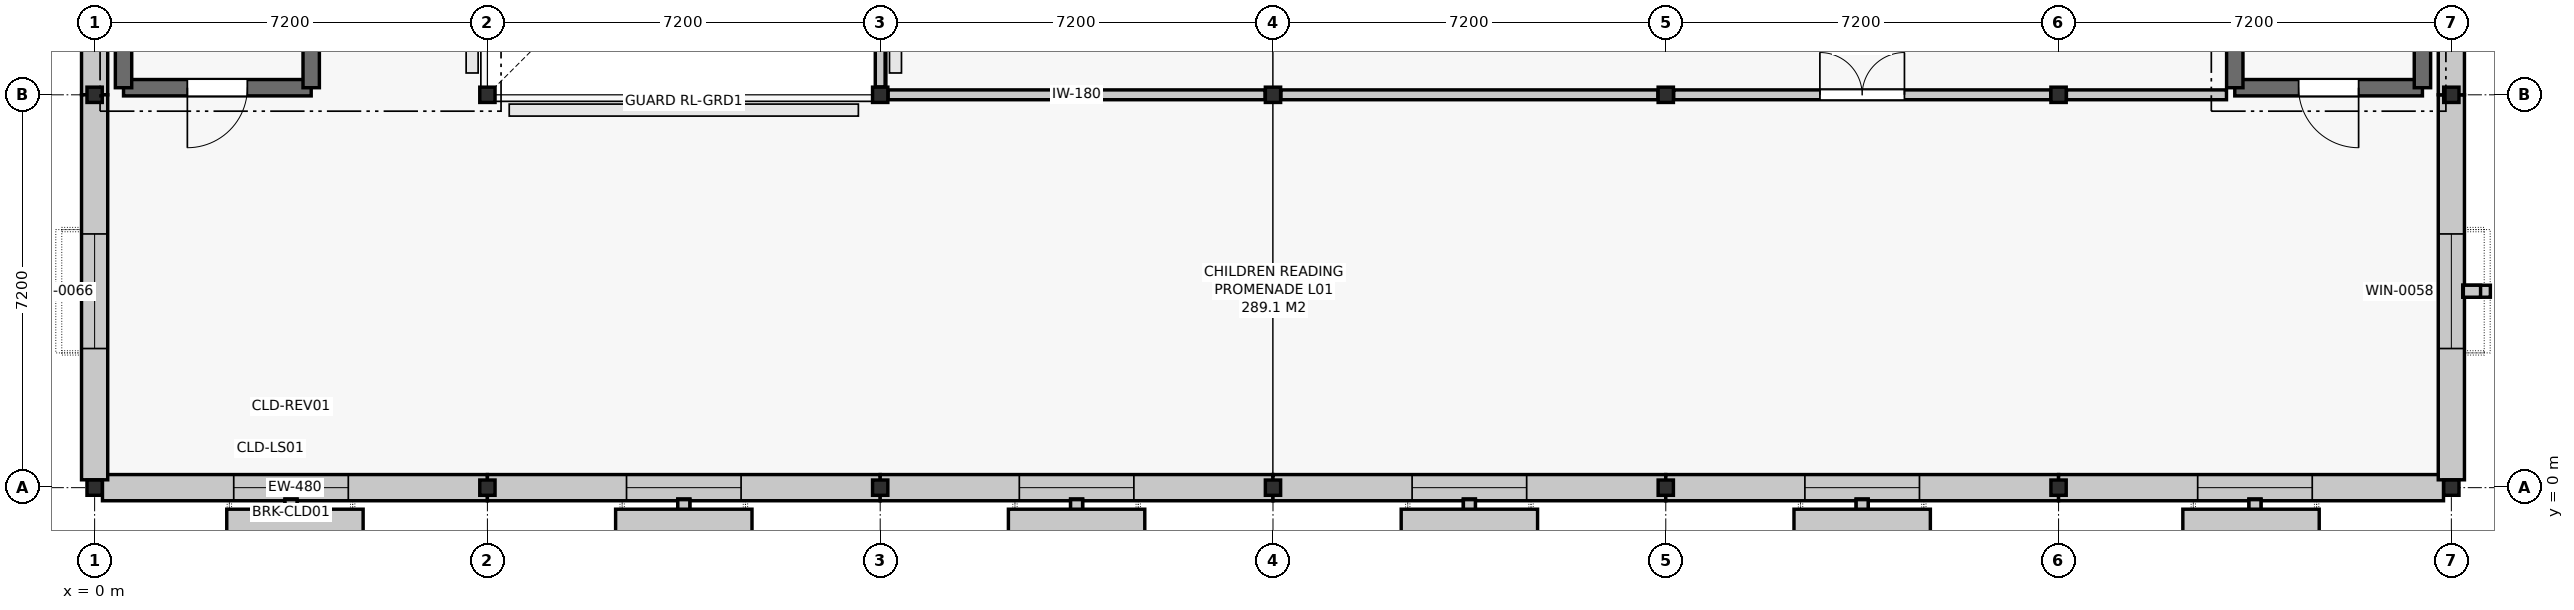
"""IFC4 building model, lengths in metres.
Left out: names, types, materials, properties, quantities, classifications, styles, units other than length and angle.
Written with IfcOpenShell. Run it as: python <this file> out.ifc"""

import sys

from ifc_helpers import new_model, si_unit, direction, frame, frame_2d, origin, origin_2d, place, context, subcontext, project, spatial, rectangle, i_section, extrude, element, fill, save


model = new_model("IFC4")
c1 = context("Model", 3, precision=1e-05, world=origin(), true_north=direction((0.0, 1.0)))
c2 = subcontext(c1, "Body", "Model", "MODEL_VIEW")
j1 = project(units=[si_unit("LENGTHUNIT", "METRE"), si_unit("PLANEANGLEUNIT", "RADIAN")], contexts=[c1])
p1 = place(None, origin())
s1 = spatial("IfcSite", under=j1, at=p1, CompositionType="ELEMENT")
p2 = place(p1, origin())
s2 = spatial("IfcBuilding", under=s1, at=p2, CompositionType="ELEMENT")
p3 = place(p2, frame((0.0, 0.0, 5.4)))
s3 = spatial("IfcBuildingStorey", under=s2, at=p3, CompositionType="ELEMENT", Elevation=5.4)
for number, where, z_axis, x_axis in (
    (1, (0.0, 0.0, 0.0), (0.0, 0.0, 1.0), (1.0, 0.0, 0.0)),
    (2, (0.0, 7.2, 0.0), (0.0, 0.0, 1.0), (1.0, 0.0, 0.0)),
    (3, (7.2, 0.0, 0.0), (0.0, 0.0, 1.0), (1.0, 0.0, 0.0)),
    (4, (7.2, 7.2, 0.0), (0.0, 0.0, 1.0), (1.0, 0.0, 0.0)),
    (5, (14.4, 0.0, 0.0), (0.0, 0.0, 1.0), (1.0, 0.0, 0.0)),
    (6, (14.4, 7.2, 0.0), (0.0, 0.0, 1.0), (1.0, 0.0, 0.0)),
    (7, (21.6, 0.0, 0.0), (0.0, 0.0, 1.0), (1.0, 0.0, 0.0)),
    (8, (21.6, 7.2, 0.0), (0.0, 0.0, 1.0), (1.0, 0.0, 0.0)),
    (9, (28.8, 0.0, 0.0), (0.0, 0.0, 1.0), (1.0, 0.0, 0.0)),
    (10, (28.8, 7.2, 0.0), (0.0, 0.0, 1.0), (1.0, 0.0, 0.0)),
    (11, (36.0, 0.0, 0.0), (0.0, 0.0, 1.0), (1.0, 0.0, 0.0)),
    (12, (36.0, 7.2, 0.0), (0.0, 0.0, 1.0), (1.0, 0.0, 0.0)),
    (13, (43.2, 0.0, 0.0), (0.0, 0.0, 1.0), (1.0, 0.0, 0.0)),
    (14, (43.2, 7.2, 0.0), (0.0, 0.0, 1.0), (1.0, 0.0, 0.0)),
):
    element("IfcColumn", number, at=place(p3, frame(where, z_axis=z_axis, x_axis=x_axis)), inside=s3, PredefinedType="COLUMN", context=c2, shape_type="SweptSolid", body=[
        extrude(i_section(OverallWidth=0.28, OverallDepth=0.28, WebThickness=0.01, FlangeThickness=0.018, FilletRadius=0.024, at=origin_2d()), origin(), (0.0, 0.0, 1.0), 4.8),
    ])
p4 = place(p3, frame((0.144, 0.0, 0.0), z_axis=(0.0, 0.0, 1.0), x_axis=(1.0, 0.0, 0.0)))
e15 = element("IfcWall", 15, at=p4, inside=s3, PredefinedType="SOLIDWALL", context=c2, shape_type="SweptSolid", body=[
    extrude(rectangle(XDim=7.056, YDim=0.48, at=frame_2d((3.528, 0.0))), origin(), (0.0, 0.0, 1.0), 3.8),
])
p5 = place(p4, frame((2.406, 0.0, 0.9)))
e16 = element("IfcOpeningElement", 16, at=p5, cuts=e15, PredefinedType="OPENING", context=c2, shape_type="SweptSolid", body=[
    extrude(rectangle(XDim=2.1, YDim=2.1, at=frame_2d((1.05, 1.05))), frame((0.0, 0.252, 0.0), z_axis=(0.0, -1.0, 0.0), x_axis=(1.0, 0.0, 0.0)), (0.0, 0.0, 1.0), 0.504),
])
p6 = place(p3, frame((7.2, 0.0, 0.0), z_axis=(0.0, 0.0, 1.0), x_axis=(1.0, 0.0, 0.0)))
e17 = element("IfcWall", 17, at=p6, inside=s3, PredefinedType="SOLIDWALL", context=c2, shape_type="SweptSolid", body=[
    extrude(rectangle(XDim=7.2, YDim=0.48, at=frame_2d((3.6, 0.0))), origin(), (0.0, 0.0, 1.0), 3.8),
])
p7 = place(p6, frame((2.55, 0.0, 0.9)))
e18 = element("IfcOpeningElement", 18, at=p7, cuts=e17, PredefinedType="OPENING", context=c2, shape_type="SweptSolid", body=[
    extrude(rectangle(XDim=2.1, YDim=2.1, at=frame_2d((1.05, 1.05))), frame((0.0, 0.252, 0.0), z_axis=(0.0, -1.0, 0.0), x_axis=(1.0, 0.0, 0.0)), (0.0, 0.0, 1.0), 0.504),
])
p8 = place(p3, frame((14.4, 0.0, 0.0), z_axis=(0.0, 0.0, 1.0), x_axis=(1.0, 0.0, 0.0)))
e19 = element("IfcWall", 19, at=p8, inside=s3, PredefinedType="SOLIDWALL", context=c2, shape_type="SweptSolid", body=[
    extrude(rectangle(XDim=7.2, YDim=0.48, at=frame_2d((3.6, 0.0))), origin(), (0.0, 0.0, 1.0), 3.8),
])
p9 = place(p8, frame((2.55, 0.0, 0.9)))
e20 = element("IfcOpeningElement", 20, at=p9, cuts=e19, PredefinedType="OPENING", context=c2, shape_type="SweptSolid", body=[
    extrude(rectangle(XDim=2.1, YDim=2.1, at=frame_2d((1.05, 1.05))), frame((0.0, 0.252, 0.0), z_axis=(0.0, -1.0, 0.0), x_axis=(1.0, 0.0, 0.0)), (0.0, 0.0, 1.0), 0.504),
])
p10 = place(p3, frame((21.6, 0.0, 0.0), z_axis=(0.0, 0.0, 1.0), x_axis=(1.0, 0.0, 0.0)))
e21 = element("IfcWall", 21, at=p10, inside=s3, PredefinedType="SOLIDWALL", context=c2, shape_type="SweptSolid", body=[
    extrude(rectangle(XDim=7.2, YDim=0.48, at=frame_2d((3.6, 0.0))), origin(), (0.0, 0.0, 1.0), 3.8),
])
p11 = place(p10, frame((2.55, 0.0, 0.9)))
e22 = element("IfcOpeningElement", 22, at=p11, cuts=e21, PredefinedType="OPENING", context=c2, shape_type="SweptSolid", body=[
    extrude(rectangle(XDim=2.1, YDim=2.1, at=frame_2d((1.05, 1.05))), frame((0.0, 0.252, 0.0), z_axis=(0.0, -1.0, 0.0), x_axis=(1.0, 0.0, 0.0)), (0.0, 0.0, 1.0), 0.504),
])
p12 = place(p3, frame((28.8, 0.0, 0.0), z_axis=(0.0, 0.0, 1.0), x_axis=(1.0, 0.0, 0.0)))
e23 = element("IfcWall", 23, at=p12, inside=s3, PredefinedType="SOLIDWALL", context=c2, shape_type="SweptSolid", body=[
    extrude(rectangle(XDim=7.2, YDim=0.48, at=frame_2d((3.6, 0.0))), origin(), (0.0, 0.0, 1.0), 3.8),
])
p13 = place(p12, frame((2.55, 0.0, 0.9)))
e24 = element("IfcOpeningElement", 24, at=p13, cuts=e23, PredefinedType="OPENING", context=c2, shape_type="SweptSolid", body=[
    extrude(rectangle(XDim=2.1, YDim=2.1, at=frame_2d((1.05, 1.05))), frame((0.0, 0.252, 0.0), z_axis=(0.0, -1.0, 0.0), x_axis=(1.0, 0.0, 0.0)), (0.0, 0.0, 1.0), 0.504),
])
p14 = place(p3, frame((36.0, 0.0, 0.0), z_axis=(0.0, 0.0, 1.0), x_axis=(1.0, 0.0, 0.0)))
e25 = element("IfcWall", 25, at=p14, inside=s3, PredefinedType="SOLIDWALL", context=c2, shape_type="SweptSolid", body=[
    extrude(rectangle(XDim=7.056, YDim=0.48, at=frame_2d((3.528, 0.0))), origin(), (0.0, 0.0, 1.0), 3.8),
])
p15 = place(p14, frame((2.55, 0.0, 0.9)))
e26 = element("IfcOpeningElement", 26, at=p15, cuts=e25, PredefinedType="OPENING", context=c2, shape_type="SweptSolid", body=[
    extrude(rectangle(XDim=2.1, YDim=2.1, at=frame_2d((1.05, 1.05))), frame((0.0, 0.252, 0.0), z_axis=(0.0, -1.0, 0.0), x_axis=(1.0, 0.0, 0.0)), (0.0, 0.0, 1.0), 0.504),
])
p16 = place(p3, frame((43.2, 0.144, 0.0), z_axis=(0.0, 0.0, 1.0), x_axis=(0.0, 1.0, 0.0)))
e27 = element("IfcWall", 27, at=p16, inside=s3, PredefinedType="SOLIDWALL", context=c2, shape_type="SweptSolid", body=[
    extrude(rectangle(XDim=7.056, YDim=0.48, at=frame_2d((3.528, 0.0))), origin(), (0.0, 0.0, 1.0), 3.8),
])
p17 = place(p16, frame((2.406, 0.0, 0.9)))
e28 = element("IfcOpeningElement", 28, at=p17, cuts=e27, PredefinedType="OPENING", context=c2, shape_type="SweptSolid", body=[
    extrude(rectangle(XDim=2.1, YDim=2.1, at=frame_2d((1.05, 1.05))), frame((0.0, 0.252, 0.0), z_axis=(0.0, -1.0, 0.0), x_axis=(1.0, 0.0, 0.0)), (0.0, 0.0, 1.0), 0.504),
])
p18 = place(p3, frame((43.2, 7.2, 0.0), z_axis=(0.0, 0.0, 1.0), x_axis=(0.0, 1.0, 0.0)))
e29 = element("IfcWall", 29, at=p18, inside=s3, PredefinedType="SOLIDWALL", context=c2, shape_type="SweptSolid", body=[
    extrude(rectangle(XDim=7.2, YDim=0.48, at=frame_2d((3.6, 0.0))), origin(), (0.0, 0.0, 1.0), 3.8),
])
p19 = place(p18, frame((2.55, 0.0, 0.9)))
e30 = element("IfcOpeningElement", 30, at=p19, cuts=e29, PredefinedType="OPENING", context=c2, shape_type="SweptSolid", body=[
    extrude(rectangle(XDim=2.1, YDim=2.1, at=frame_2d((1.05, 1.05))), frame((0.0, 0.252, 0.0), z_axis=(0.0, -1.0, 0.0), x_axis=(1.0, 0.0, 0.0)), (0.0, 0.0, 1.0), 0.504),
])
p20 = place(p3, frame((0.0, 14.4, 0.0), z_axis=(0.0, 0.0, 1.0), x_axis=(0.0, -1.0, 0.0)))
e31 = element("IfcWall", 31, at=p20, inside=s3, PredefinedType="SOLIDWALL", context=c2, shape_type="SweptSolid", body=[
    extrude(rectangle(XDim=7.2, YDim=0.48, at=frame_2d((3.6, 0.0))), origin(), (0.0, 0.0, 1.0), 3.8),
])
p21 = place(p20, frame((2.55, 0.0, 0.9)))
e32 = element("IfcOpeningElement", 32, at=p21, cuts=e31, PredefinedType="OPENING", context=c2, shape_type="SweptSolid", body=[
    extrude(rectangle(XDim=2.1, YDim=2.1, at=frame_2d((1.05, 1.05))), frame((0.0, 0.252, 0.0), z_axis=(0.0, -1.0, 0.0), x_axis=(1.0, 0.0, 0.0)), (0.0, 0.0, 1.0), 0.504),
])
p22 = place(p3, frame((0.0, 7.2, 0.0), z_axis=(0.0, 0.0, 1.0), x_axis=(0.0, -1.0, 0.0)))
e33 = element("IfcWall", 33, at=p22, inside=s3, PredefinedType="SOLIDWALL", context=c2, shape_type="SweptSolid", body=[
    extrude(rectangle(XDim=7.056, YDim=0.48, at=frame_2d((3.528, 0.0))), origin(), (0.0, 0.0, 1.0), 3.8),
])
p23 = place(p22, frame((2.55, 0.0, 0.9)))
e34 = element("IfcOpeningElement", 34, at=p23, cuts=e33, PredefinedType="OPENING", context=c2, shape_type="SweptSolid", body=[
    extrude(rectangle(XDim=2.1, YDim=2.1, at=frame_2d((1.05, 1.05))), frame((0.0, 0.252, 0.0), z_axis=(0.0, -1.0, 0.0), x_axis=(1.0, 0.0, 0.0)), (0.0, 0.0, 1.0), 0.504),
])
p24 = place(p3, frame((0.53, 7.33, 0.0), z_axis=(0.0, 0.0, 1.0), x_axis=(1.0, 0.0, 0.0)))
e35 = element("IfcWall", 35, at=p24, inside=s3, PredefinedType="SHEAR", context=c2, shape_type="SweptSolid", body=[
    extrude(rectangle(XDim=3.44, YDim=0.3, at=frame_2d((1.72, 0.0))), origin(), (0.0, 0.0, 1.0), 4.52),
])
p25 = place(p24, frame((1.17, 0.0, 0.0)))
e36 = element("IfcOpeningElement", 36, at=p25, cuts=e35, PredefinedType="OPENING", context=c2, shape_type="SweptSolid", body=[
    extrude(rectangle(XDim=1.1, YDim=2.15, at=frame_2d((0.55, 1.075))), frame((0.0, 0.162, 0.0), z_axis=(0.0, -1.0, 0.0), x_axis=(1.0, 0.0, 0.0)), (0.0, 0.0, 1.0), 0.324),
])
for number, where, z_axis, x_axis in (
    (37, (3.97, 7.33, 0.0), (0.0, 0.0, 1.0), (0.0, 1.0, 0.0)),
    (38, (0.53, 14.27, 0.0), (0.0, 0.0, 1.0), (0.0, -1.0, 0.0)),
):
    element("IfcWall", number, at=place(p3, frame(where, z_axis=z_axis, x_axis=x_axis)), inside=s3, PredefinedType="SHEAR", context=c2, shape_type="SweptSolid", body=[
        extrude(rectangle(XDim=6.94, YDim=0.3, at=frame_2d((3.47, 0.0))), origin(), (0.0, 0.0, 1.0), 4.52),
    ])
p26 = place(p3, frame((39.23, 7.33, 0.0), z_axis=(0.0, 0.0, 1.0), x_axis=(1.0, 0.0, 0.0)))
e39 = element("IfcWall", 39, at=p26, inside=s3, PredefinedType="SHEAR", context=c2, shape_type="SweptSolid", body=[
    extrude(rectangle(XDim=3.44, YDim=0.3, at=frame_2d((1.72, 0.0))), origin(), (0.0, 0.0, 1.0), 4.52),
])
p27 = place(p26, frame((1.17, 0.0, 0.0)))
e40 = element("IfcOpeningElement", 40, at=p27, cuts=e39, PredefinedType="OPENING", context=c2, shape_type="SweptSolid", body=[
    extrude(rectangle(XDim=1.1, YDim=2.15, at=frame_2d((0.55, 1.075))), frame((0.0, 0.162, 0.0), z_axis=(0.0, -1.0, 0.0), x_axis=(1.0, 0.0, 0.0)), (0.0, 0.0, 1.0), 0.324),
])
for number, where, z_axis, x_axis in (
    (41, (42.67, 7.33, 0.0), (0.0, 0.0, 1.0), (0.0, 1.0, 0.0)),
    (42, (39.23, 14.27, 0.0), (0.0, 0.0, 1.0), (0.0, -1.0, 0.0)),
):
    element("IfcWall", number, at=place(p3, frame(where, z_axis=z_axis, x_axis=x_axis)), inside=s3, PredefinedType="SHEAR", context=c2, shape_type="SweptSolid", body=[
        extrude(rectangle(XDim=6.94, YDim=0.3, at=frame_2d((3.47, 0.0))), origin(), (0.0, 0.0, 1.0), 4.52),
    ])
for number, where, z_axis, x_axis in (
    (43, (14.544, 7.2, 0.0), (0.0, 0.0, 1.0), (1.0, 0.0, 0.0)),
    (44, (21.744, 7.2, 0.0), (0.0, 0.0, 1.0), (1.0, 0.0, 0.0)),
):
    element("IfcWall", number, at=place(p3, frame(where, z_axis=z_axis, x_axis=x_axis)), inside=s3, PredefinedType="PARTITIONING", context=c2, shape_type="SweptSolid", body=[
        extrude(rectangle(XDim=6.912, YDim=0.18, at=frame_2d((3.456, 0.0))), origin(), (0.0, 0.0, 1.0), 4.005),
    ])
p28 = place(p3, frame((28.944, 7.2, 0.0), z_axis=(0.0, 0.0, 1.0), x_axis=(1.0, 0.0, 0.0)))
e45 = element("IfcWall", 45, at=p28, inside=s3, PredefinedType="PARTITIONING", context=c2, shape_type="SweptSolid", body=[
    extrude(rectangle(XDim=6.912, YDim=0.18, at=frame_2d((3.456, 0.0))), origin(), (0.0, 0.0, 1.0), 4.005),
])
p29 = place(p28, frame((2.681, 0.0, 0.0)))
e46 = element("IfcOpeningElement", 46, at=p29, cuts=e45, PredefinedType="OPENING", context=c2, shape_type="SweptSolid", body=[
    extrude(rectangle(XDim=1.55, YDim=2.2, at=frame_2d((0.775, 1.1))), frame((0.0, 0.102, 0.0), z_axis=(0.0, -1.0, 0.0), x_axis=(1.0, 0.0, 0.0)), (0.0, 0.0, 1.0), 0.204),
])
p30 = place(p3, frame((36.144, 7.2, 0.0), z_axis=(0.0, 0.0, 1.0), x_axis=(1.0, 0.0, 0.0)))
e47 = element("IfcWall", 47, at=p30, inside=s3, PredefinedType="PARTITIONING", context=c2, shape_type="SweptSolid", body=[
    extrude(rectangle(XDim=2.934, YDim=0.18, at=frame_2d((1.467, 0.0))), origin(), (0.0, 0.0, 1.0), 4.005),
])
p31 = place(p3, frame((14.4, 7.344, 0.0), z_axis=(0.0, 0.0, 1.0), x_axis=(0.0, 1.0, 0.0)))
e48 = element("IfcWall", 48, at=p31, inside=s3, PredefinedType="PARTITIONING", context=c2, shape_type="SweptSolid", body=[
    extrude(rectangle(XDim=6.912, YDim=0.18, at=frame_2d((3.456, 0.0))), origin(), (0.0, 0.0, 1.0), 4.065),
])
p32 = place(p5, origin())
e49 = element("IfcWindow", 49, at=p32, inside=s3, PartitioningType="SINGLE_PANEL", PredefinedType="WINDOW", context=c2, shape_type="SweptSolid", body=[
    extrude(rectangle(XDim=2.1, YDim=2.1, at=frame_2d((1.05, 1.05))), frame((0.0, 0.03, 0.0), z_axis=(0.0, -1.0, 0.0), x_axis=(1.0, 0.0, 0.0)), (0.0, 0.0, 1.0), 0.06),
])
fill(e16, e49)
p33 = place(p7, origin())
e50 = element("IfcWindow", 50, at=p33, inside=s3, PartitioningType="SINGLE_PANEL", PredefinedType="WINDOW", context=c2, shape_type="SweptSolid", body=[
    extrude(rectangle(XDim=2.1, YDim=2.1, at=frame_2d((1.05, 1.05))), frame((0.0, 0.03, 0.0), z_axis=(0.0, -1.0, 0.0), x_axis=(1.0, 0.0, 0.0)), (0.0, 0.0, 1.0), 0.06),
])
fill(e18, e50)
p34 = place(p9, origin())
e51 = element("IfcWindow", 51, at=p34, inside=s3, PartitioningType="SINGLE_PANEL", PredefinedType="WINDOW", context=c2, shape_type="SweptSolid", body=[
    extrude(rectangle(XDim=2.1, YDim=2.1, at=frame_2d((1.05, 1.05))), frame((0.0, 0.03, 0.0), z_axis=(0.0, -1.0, 0.0), x_axis=(1.0, 0.0, 0.0)), (0.0, 0.0, 1.0), 0.06),
])
fill(e20, e51)
p35 = place(p11, origin())
e52 = element("IfcWindow", 52, at=p35, inside=s3, PartitioningType="SINGLE_PANEL", PredefinedType="WINDOW", context=c2, shape_type="SweptSolid", body=[
    extrude(rectangle(XDim=2.1, YDim=2.1, at=frame_2d((1.05, 1.05))), frame((0.0, 0.03, 0.0), z_axis=(0.0, -1.0, 0.0), x_axis=(1.0, 0.0, 0.0)), (0.0, 0.0, 1.0), 0.06),
])
fill(e22, e52)
p36 = place(p13, origin())
e53 = element("IfcWindow", 53, at=p36, inside=s3, PartitioningType="SINGLE_PANEL", PredefinedType="WINDOW", context=c2, shape_type="SweptSolid", body=[
    extrude(rectangle(XDim=2.1, YDim=2.1, at=frame_2d((1.05, 1.05))), frame((0.0, 0.03, 0.0), z_axis=(0.0, -1.0, 0.0), x_axis=(1.0, 0.0, 0.0)), (0.0, 0.0, 1.0), 0.06),
])
fill(e24, e53)
p37 = place(p15, origin())
e54 = element("IfcWindow", 54, at=p37, inside=s3, PartitioningType="SINGLE_PANEL", PredefinedType="WINDOW", context=c2, shape_type="SweptSolid", body=[
    extrude(rectangle(XDim=2.1, YDim=2.1, at=frame_2d((1.05, 1.05))), frame((0.0, 0.03, 0.0), z_axis=(0.0, -1.0, 0.0), x_axis=(1.0, 0.0, 0.0)), (0.0, 0.0, 1.0), 0.06),
])
fill(e26, e54)
p38 = place(p17, origin())
e55 = element("IfcWindow", 55, at=p38, inside=s3, PartitioningType="SINGLE_PANEL", PredefinedType="WINDOW", context=c2, shape_type="SweptSolid", body=[
    extrude(rectangle(XDim=2.1, YDim=2.1, at=frame_2d((1.05, 1.05))), frame((0.0, 0.03, 0.0), z_axis=(0.0, -1.0, 0.0), x_axis=(1.0, 0.0, 0.0)), (0.0, 0.0, 1.0), 0.06),
])
fill(e28, e55)
p39 = place(p23, origin())
e56 = element("IfcWindow", 56, at=p39, inside=s3, PartitioningType="SINGLE_PANEL", PredefinedType="WINDOW", context=c2, shape_type="SweptSolid", body=[
    extrude(rectangle(XDim=2.1, YDim=2.1, at=frame_2d((1.05, 1.05))), frame((0.0, 0.03, 0.0), z_axis=(0.0, -1.0, 0.0), x_axis=(1.0, 0.0, 0.0)), (0.0, 0.0, 1.0), 0.06),
])
fill(e34, e56)
p40 = place(p25, frame((1.1, 0.0, 0.0), z_axis=(0.0, 0.0, 1.0), x_axis=(-1.0, 0.0, 0.0)))
e57 = element("IfcDoor", 57, at=p40, inside=s3, OperationType="SINGLE_SWING_RIGHT", PredefinedType="DOOR", context=c2, shape_type="SweptSolid", body=[
    extrude(rectangle(XDim=1.1, YDim=2.15, at=frame_2d((0.55, 1.075))), frame((0.0, 0.025, 0.0), z_axis=(0.0, -1.0, 0.0), x_axis=(1.0, 0.0, 0.0)), (0.0, 0.0, 1.0), 0.05),
])
fill(e36, e57)
p41 = place(p27, frame((1.1, 0.0, 0.0), z_axis=(0.0, 0.0, 1.0), x_axis=(-1.0, 0.0, 0.0)))
e58 = element("IfcDoor", 58, at=p41, inside=s3, OperationType="SINGLE_SWING_LEFT", PredefinedType="DOOR", context=c2, shape_type="SweptSolid", body=[
    extrude(rectangle(XDim=1.1, YDim=2.15, at=frame_2d((0.55, 1.075))), frame((0.0, 0.025, 0.0), z_axis=(0.0, -1.0, 0.0), x_axis=(1.0, 0.0, 0.0)), (0.0, 0.0, 1.0), 0.05),
])
fill(e40, e58)
p42 = place(p29, origin())
e59 = element("IfcDoor", 59, at=p42, inside=s3, OperationType="DOUBLE_DOOR_SINGLE_SWING", PredefinedType="DOOR", context=c2, shape_type="SweptSolid", body=[
    extrude(rectangle(XDim=1.55, YDim=2.2, at=frame_2d((0.775, 1.1))), frame((0.0, 0.025, 0.0), z_axis=(0.0, -1.0, 0.0), x_axis=(1.0, 0.0, 0.0)), (0.0, 0.0, 1.0), 0.05),
])
fill(e46, e59)
save(model, sys.argv[1])
